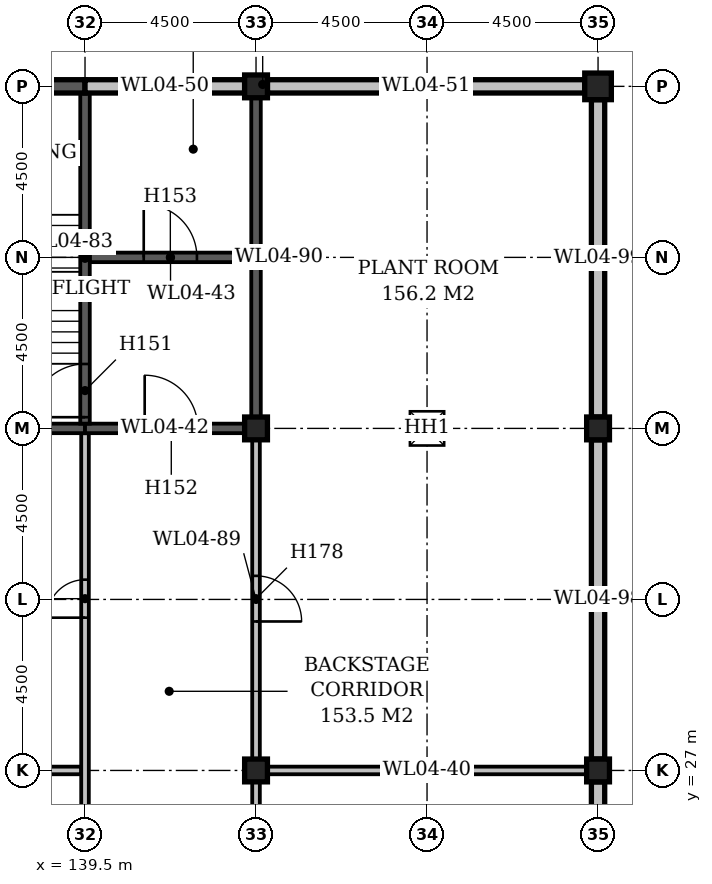
"""IFC4 building model, lengths in metres.
Left out: names, types, materials, properties, quantities, classifications, styles, units other than length and angle.
Written with IfcOpenShell. Run it as: python <this file> out.ifc"""

import sys

from ifc_helpers import new_model, si_unit, direction, frame, frame_2d, origin, origin_2d, place, context, subcontext, project, spatial, rectangle, extrude, element, fill, save


model = new_model("IFC4")
c1 = context("Model", 3, precision=1e-05, world=origin(), true_north=direction((0.0, 1.0)))
c2 = subcontext(c1, "Body", "Model", "MODEL_VIEW")
j1 = project(units=[si_unit("LENGTHUNIT", "METRE"), si_unit("PLANEANGLEUNIT", "RADIAN")], contexts=[c1])
p1 = place(None, origin())
s1 = spatial("IfcSite", under=j1, at=p1, CompositionType="ELEMENT")
p2 = place(p1, origin())
s2 = spatial("IfcBuilding", under=s1, at=p2, CompositionType="ELEMENT")
p3 = place(p2, frame((0.0, 0.0, 24.0)))
s3 = spatial("IfcBuildingStorey", under=s2, at=p3, CompositionType="ELEMENT", Elevation=24.0)
for number, where, z_axis, x_axis in (
    (1, (144.0, 27.0, 0.0), (0.0, 0.0, 1.0), (1.0, 0.0, 0.0)),
    (2, (144.0, 36.0, 0.0), (0.0, 0.0, 1.0), (1.0, 0.0, 0.0)),
    (3, (144.0, 45.0, 0.0), (0.0, 0.0, 1.0), (1.0, 0.0, 0.0)),
    (4, (153.0, 27.0, 0.0), (0.0, 0.0, 1.0), (1.0, 0.0, 0.0)),
    (5, (153.0, 36.0, 0.0), (0.0, 0.0, 1.0), (1.0, 0.0, 0.0)),
):
    element("IfcColumn", number, at=place(p3, frame(where, z_axis=z_axis, x_axis=x_axis)), inside=s3, PredefinedType="COLUMN", context=c2, shape_type="SweptSolid", body=[
        extrude(rectangle(XDim=0.6, YDim=0.6, at=origin_2d()), origin(), (0.0, 0.0, 1.0), 4.7),
    ])
p4 = place(p3, frame((153.0, 45.0, 0.0), z_axis=(0.0, 0.0, 1.0), x_axis=(1.0, 0.0, 0.0)))
e6 = element("IfcColumn", 6, at=p4, inside=s3, PredefinedType="COLUMN", context=c2, shape_type="SweptSolid", body=[
    extrude(rectangle(XDim=0.7, YDim=0.7, at=origin_2d()), origin(), (0.0, 0.0, 1.0), 4.7),
])
p5 = place(p3, frame((135.4, 27.0, 0.0), z_axis=(0.0, 0.0, 1.0), x_axis=(1.0, 0.0, 0.0)))
e7 = element("IfcWall", 7, at=p5, inside=s3, PredefinedType="STANDARD", context=c2, shape_type="SweptSolid", body=[
    extrude(rectangle(XDim=4.0, YDim=0.2, at=frame_2d((2.0, 0.0))), origin(), (0.0, 0.0, 1.0), 4.7),
])
p6 = place(p3, frame((144.3, 27.0, 0.0), z_axis=(0.0, 0.0, 1.0), x_axis=(1.0, 0.0, 0.0)))
e8 = element("IfcWall", 8, at=p6, inside=s3, PredefinedType="STANDARD", context=c2, shape_type="SweptSolid", body=[
    extrude(rectangle(XDim=8.4, YDim=0.2, at=frame_2d((4.2, 0.0))), origin(), (0.0, 0.0, 1.0), 4.7),
])
p7 = place(p3, frame((135.3, 36.0, 0.0), z_axis=(0.0, 0.0, 1.0), x_axis=(1.0, 0.0, 0.0)))
e9 = element("IfcWall", 9, at=p7, inside=s3, PredefinedType="STANDARD", context=c2, shape_type="SweptSolid", body=[
    extrude(rectangle(XDim=4.2, YDim=0.25, at=frame_2d((2.1, 0.0))), origin(), (0.0, 0.0, 1.0), 4.7),
])
p8 = place(p3, frame((139.5, 36.0, 0.0), z_axis=(0.0, 0.0, 1.0), x_axis=(1.0, 0.0, 0.0)))
e10 = element("IfcWall", 10, at=p8, inside=s3, PredefinedType="STANDARD", context=c2, shape_type="SweptSolid", body=[
    extrude(rectangle(XDim=4.2, YDim=0.25, at=frame_2d((2.1, 0.0))), origin(), (0.0, 0.0, 1.0), 4.7),
])
p9 = place(p8, frame((1.57, 0.0, 0.0)))
e11 = element("IfcOpeningElement", 11, at=p9, cuts=e10, PredefinedType="OPENING", context=c2, shape_type="SweptSolid", body=[
    extrude(rectangle(XDim=1.4, YDim=2.1, at=frame_2d((0.7, 1.05))), frame((0.0, 0.137, 0.0), z_axis=(0.0, -1.0, 0.0), x_axis=(1.0, 0.0, 0.0)), (0.0, 0.0, 1.0), 0.274),
])
p10 = place(p3, frame((139.625, 40.5, 0.0), z_axis=(0.0, 0.0, 1.0), x_axis=(1.0, 0.0, 0.0)))
e12 = element("IfcWall", 12, at=p10, inside=s3, PredefinedType="STANDARD", context=c2, shape_type="SweptSolid", body=[
    extrude(rectangle(XDim=4.25, YDim=0.25, at=frame_2d((2.125, 0.0))), origin(), (0.0, 0.0, 1.0), 4.7),
])
p11 = place(p10, frame((1.42, 0.0, 0.0)))
e13 = element("IfcOpeningElement", 13, at=p11, cuts=e12, PredefinedType="OPENING", context=c2, shape_type="SweptSolid", body=[
    extrude(rectangle(XDim=1.4, YDim=2.1, at=frame_2d((0.7, 1.05))), frame((0.0, 0.137, 0.0), z_axis=(0.0, -1.0, 0.0), x_axis=(1.0, 0.0, 0.0)), (0.0, 0.0, 1.0), 0.274),
])
p12 = place(p3, frame((135.4, 45.0, 0.0), z_axis=(0.0, 0.0, 1.0), x_axis=(1.0, 0.0, 0.0)))
e14 = element("IfcWall", 14, at=p12, inside=s3, PredefinedType="STANDARD", context=c2, shape_type="SweptSolid", body=[
    extrude(rectangle(XDim=4.1, YDim=0.35, at=frame_2d((2.05, 0.0))), origin(), (0.0, 0.0, 1.0), 4.1),
])
p13 = place(p3, frame((139.5, 45.0, 0.0), z_axis=(0.0, 0.0, 1.0), x_axis=(1.0, 0.0, 0.0)))
e15 = element("IfcWall", 15, at=p13, inside=s3, PredefinedType="STANDARD", context=c2, shape_type="SweptSolid", body=[
    extrude(rectangle(XDim=4.2, YDim=0.35, at=frame_2d((2.1, 0.0))), origin(), (0.0, 0.0, 1.0), 4.1),
])
p14 = place(p3, frame((144.3, 45.0, 0.0), z_axis=(0.0, 0.0, 1.0), x_axis=(1.0, 0.0, 0.0)))
e16 = element("IfcWall", 16, at=p14, inside=s3, PredefinedType="STANDARD", context=c2, shape_type="SweptSolid", body=[
    extrude(rectangle(XDim=8.35, YDim=0.35, at=frame_2d((4.175, 0.0))), origin(), (0.0, 0.0, 1.0), 4.1),
])
p15 = place(p3, frame((139.5, 0.1, 0.0), z_axis=(0.0, 0.0, 1.0), x_axis=(0.0, 1.0, 0.0)))
e17 = element("IfcWall", 17, at=p15, inside=s3, PredefinedType="STANDARD", context=c2, shape_type="SweptSolid", body=[
    extrude(rectangle(XDim=35.775, YDim=0.2, at=frame_2d((17.887, 0.0))), origin(), (0.0, 0.0, 1.0), 4.7),
])
p16 = place(p15, frame((6.17, 0.0, 0.0)))
e18 = element("IfcOpeningElement", 18, at=p16, cuts=e17, PredefinedType="OPENING", context=c2, shape_type="SweptSolid", body=[
    extrude(rectangle(XDim=1.0, YDim=2.1, at=frame_2d((0.5, 1.05))), frame((0.0, 0.112, 0.0), z_axis=(0.0, -1.0, 0.0), x_axis=(1.0, 0.0, 0.0)), (0.0, 0.0, 1.0), 0.224),
])
p17 = place(p15, frame((10.67, 0.0, 0.0)))
e19 = element("IfcOpeningElement", 19, at=p17, cuts=e17, PredefinedType="OPENING", context=c2, shape_type="SweptSolid", body=[
    extrude(rectangle(XDim=1.0, YDim=2.1, at=frame_2d((0.5, 1.05))), frame((0.0, 0.112, 0.0), z_axis=(0.0, -1.0, 0.0), x_axis=(1.0, 0.0, 0.0)), (0.0, 0.0, 1.0), 0.224),
])
p18 = place(p15, frame((15.17, 0.0, 0.0)))
e20 = element("IfcOpeningElement", 20, at=p18, cuts=e17, PredefinedType="OPENING", context=c2, shape_type="SweptSolid", body=[
    extrude(rectangle(XDim=1.0, YDim=2.1, at=frame_2d((0.5, 1.05))), frame((0.0, 0.112, 0.0), z_axis=(0.0, -1.0, 0.0), x_axis=(1.0, 0.0, 0.0)), (0.0, 0.0, 1.0), 0.224),
])
p19 = place(p15, frame((19.67, 0.0, 0.0)))
e21 = element("IfcOpeningElement", 21, at=p19, cuts=e17, PredefinedType="OPENING", context=c2, shape_type="SweptSolid", body=[
    extrude(rectangle(XDim=1.0, YDim=2.1, at=frame_2d((0.5, 1.05))), frame((0.0, 0.112, 0.0), z_axis=(0.0, -1.0, 0.0), x_axis=(1.0, 0.0, 0.0)), (0.0, 0.0, 1.0), 0.224),
])
p20 = place(p15, frame((24.17, 0.0, 0.0)))
e22 = element("IfcOpeningElement", 22, at=p20, cuts=e17, PredefinedType="OPENING", context=c2, shape_type="SweptSolid", body=[
    extrude(rectangle(XDim=1.0, YDim=2.1, at=frame_2d((0.5, 1.05))), frame((0.0, 0.112, 0.0), z_axis=(0.0, -1.0, 0.0), x_axis=(1.0, 0.0, 0.0)), (0.0, 0.0, 1.0), 0.224),
])
p21 = place(p15, frame((30.92, 0.0, 0.0)))
e23 = element("IfcOpeningElement", 23, at=p21, cuts=e17, PredefinedType="OPENING", context=c2, shape_type="SweptSolid", body=[
    extrude(rectangle(XDim=1.0, YDim=2.1, at=frame_2d((0.5, 1.05))), frame((0.0, 0.112, 0.0), z_axis=(0.0, -1.0, 0.0), x_axis=(1.0, 0.0, 0.0)), (0.0, 0.0, 1.0), 0.224),
])
p22 = place(p3, frame((139.5, 36.125, 0.0), z_axis=(0.0, 0.0, 1.0), x_axis=(0.0, 1.0, 0.0)))
e24 = element("IfcWall", 24, at=p22, inside=s3, PredefinedType="STANDARD", context=c2, shape_type="SweptSolid", body=[
    extrude(rectangle(XDim=8.7, YDim=0.25, at=frame_2d((4.35, 0.0))), origin(), (0.0, 0.0, 1.0), 4.7),
])
p23 = place(p22, frame((0.17, 0.0, 0.0)))
e25 = element("IfcOpeningElement", 25, at=p23, cuts=e24, PredefinedType="OPENING", context=c2, shape_type="SweptSolid", body=[
    extrude(rectangle(XDim=1.4, YDim=2.1, at=frame_2d((0.7, 1.05))), frame((0.0, 0.137, 0.0), z_axis=(0.0, -1.0, 0.0), x_axis=(1.0, 0.0, 0.0)), (0.0, 0.0, 1.0), 0.274),
])
p24 = place(p3, frame((144.0, 18.3, 0.0), z_axis=(0.0, 0.0, 1.0), x_axis=(0.0, 1.0, 0.0)))
e26 = element("IfcWall", 26, at=p24, inside=s3, PredefinedType="STANDARD", context=c2, shape_type="SweptSolid", body=[
    extrude(rectangle(XDim=8.4, YDim=0.2, at=frame_2d((4.2, 0.0))), origin(), (0.0, 0.0, 1.0), 4.7),
])
p25 = place(p24, frame((2.87, 0.0, 0.0)))
e27 = element("IfcOpeningElement", 27, at=p25, cuts=e26, PredefinedType="OPENING", context=c2, shape_type="SweptSolid", body=[
    extrude(rectangle(XDim=1.2, YDim=2.1, at=frame_2d((0.6, 1.05))), frame((0.0, 0.112, 0.0), z_axis=(0.0, -1.0, 0.0), x_axis=(1.0, 0.0, 0.0)), (0.0, 0.0, 1.0), 0.224),
])
p26 = place(p3, frame((144.0, 27.3, 0.0), z_axis=(0.0, 0.0, 1.0), x_axis=(0.0, 1.0, 0.0)))
e28 = element("IfcWall", 28, at=p26, inside=s3, PredefinedType="STANDARD", context=c2, shape_type="SweptSolid", body=[
    extrude(rectangle(XDim=8.4, YDim=0.2, at=frame_2d((4.2, 0.0))), origin(), (0.0, 0.0, 1.0), 4.7),
])
p27 = place(p26, frame((3.62, 0.0, 0.0)))
e29 = element("IfcOpeningElement", 29, at=p27, cuts=e28, PredefinedType="OPENING", context=c2, shape_type="SweptSolid", body=[
    extrude(rectangle(XDim=1.2, YDim=2.1, at=frame_2d((0.6, 1.05))), frame((0.0, 0.112, 0.0), z_axis=(0.0, -1.0, 0.0), x_axis=(1.0, 0.0, 0.0)), (0.0, 0.0, 1.0), 0.224),
])
p28 = place(p3, frame((144.0, 36.3, 0.0), z_axis=(0.0, 0.0, 1.0), x_axis=(0.0, 1.0, 0.0)))
e30 = element("IfcWall", 30, at=p28, inside=s3, PredefinedType="STANDARD", context=c2, shape_type="SweptSolid", body=[
    extrude(rectangle(XDim=8.4, YDim=0.25, at=frame_2d((4.2, 0.0))), origin(), (0.0, 0.0, 1.0), 4.7),
])
p29 = place(p3, frame((153.0, 18.3, 0.0), z_axis=(0.0, 0.0, 1.0), x_axis=(0.0, 1.0, 0.0)))
e31 = element("IfcWall", 31, at=p29, inside=s3, PredefinedType="STANDARD", context=c2, shape_type="SweptSolid", body=[
    extrude(rectangle(XDim=8.4, YDim=0.35, at=frame_2d((4.2, 0.0))), origin(), (0.0, 0.0, 1.0), 4.1),
])
p30 = place(p29, frame((1.35, 0.0, 1.0)))
e32 = element("IfcOpeningElement", 32, at=p30, cuts=e31, PredefinedType="OPENING", context=c2, shape_type="SweptSolid", body=[
    extrude(rectangle(XDim=1.5, YDim=2.4, at=frame_2d((0.75, 1.2))), frame((0.0, 0.187, 0.0), z_axis=(0.0, -1.0, 0.0), x_axis=(1.0, 0.0, 0.0)), (0.0, 0.0, 1.0), 0.374),
])
p31 = place(p29, frame((5.55, 0.0, 1.0)))
e33 = element("IfcOpeningElement", 33, at=p31, cuts=e31, PredefinedType="OPENING", context=c2, shape_type="SweptSolid", body=[
    extrude(rectangle(XDim=1.5, YDim=2.4, at=frame_2d((0.75, 1.2))), frame((0.0, 0.187, 0.0), z_axis=(0.0, -1.0, 0.0), x_axis=(1.0, 0.0, 0.0)), (0.0, 0.0, 1.0), 0.374),
])
p32 = place(p3, frame((153.0, 27.3, 0.0), z_axis=(0.0, 0.0, 1.0), x_axis=(0.0, 1.0, 0.0)))
e34 = element("IfcWall", 34, at=p32, inside=s3, PredefinedType="STANDARD", context=c2, shape_type="SweptSolid", body=[
    extrude(rectangle(XDim=8.4, YDim=0.35, at=frame_2d((4.2, 0.0))), origin(), (0.0, 0.0, 1.0), 4.1),
])
p33 = place(p3, frame((153.0, 36.3, 0.0), z_axis=(0.0, 0.0, 1.0), x_axis=(0.0, 1.0, 0.0)))
e35 = element("IfcWall", 35, at=p33, inside=s3, PredefinedType="STANDARD", context=c2, shape_type="SweptSolid", body=[
    extrude(rectangle(XDim=8.35, YDim=0.35, at=frame_2d((4.175, 0.0))), origin(), (0.0, 0.0, 1.0), 4.1),
])
p34 = place(p3, frame((135.175, 45.05, 5.0), z_axis=(0.0, 0.0, 1.0), x_axis=(1.0, 0.0, 0.0)))
e36 = element("IfcWall", 36, at=p34, inside=s3, PredefinedType="STANDARD", context=c2, shape_type="SweptSolid", body=[
    extrude(rectangle(XDim=18.0, YDim=0.25, at=frame_2d((9.0, 0.0))), origin(), (0.0, 0.0, 1.0), 1.1),
])
p35 = place(p3, frame((153.05, -8.925, 5.0), z_axis=(0.0, 0.0, 1.0), x_axis=(0.0, 1.0, 0.0)))
e37 = element("IfcWall", 37, at=p35, inside=s3, PredefinedType="STANDARD", context=c2, shape_type="SweptSolid", body=[
    extrude(rectangle(XDim=53.85, YDim=0.25, at=frame_2d((26.925, 0.0))), origin(), (0.0, 0.0, 1.0), 1.1),
])
p36 = place(p23, origin())
e38 = element("IfcDoor", 38, at=p36, inside=s3, OperationType="DOUBLE_DOOR_SINGLE_SWING", PredefinedType="DOOR", context=c2, shape_type="SweptSolid", body=[
    extrude(rectangle(XDim=1.4, YDim=2.1, at=frame_2d((0.7, 1.05))), frame((0.0, 0.025, 0.0), z_axis=(0.0, -1.0, 0.0), x_axis=(1.0, 0.0, 0.0)), (0.0, 0.0, 1.0), 0.05),
])
fill(e25, e38)
p37 = place(p9, origin())
e39 = element("IfcDoor", 39, at=p37, inside=s3, OperationType="DOUBLE_DOOR_SINGLE_SWING", PredefinedType="DOOR", context=c2, shape_type="SweptSolid", body=[
    extrude(rectangle(XDim=1.4, YDim=2.1, at=frame_2d((0.7, 1.05))), frame((0.0, 0.025, 0.0), z_axis=(0.0, -1.0, 0.0), x_axis=(1.0, 0.0, 0.0)), (0.0, 0.0, 1.0), 0.05),
])
fill(e11, e39)
p38 = place(p11, origin())
e40 = element("IfcDoor", 40, at=p38, inside=s3, OperationType="DOUBLE_DOOR_SINGLE_SWING", PredefinedType="DOOR", context=c2, shape_type="SweptSolid", body=[
    extrude(rectangle(XDim=1.4, YDim=2.1, at=frame_2d((0.7, 1.05))), frame((0.0, 0.025, 0.0), z_axis=(0.0, -1.0, 0.0), x_axis=(1.0, 0.0, 0.0)), (0.0, 0.0, 1.0), 0.05),
])
fill(e13, e40)
p39 = place(p21, origin())
e41 = element("IfcDoor", 41, at=p39, inside=s3, OperationType="SINGLE_SWING_LEFT", PredefinedType="DOOR", context=c2, shape_type="SweptSolid", body=[
    extrude(rectangle(XDim=1.0, YDim=2.1, at=frame_2d((0.5, 1.05))), frame((0.0, 0.025, 0.0), z_axis=(0.0, -1.0, 0.0), x_axis=(1.0, 0.0, 0.0)), (0.0, 0.0, 1.0), 0.05),
])
fill(e23, e41)
p40 = place(p27, frame((1.2, 0.0, 0.0), z_axis=(0.0, 0.0, 1.0), x_axis=(-1.0, 0.0, 0.0)))
e42 = element("IfcDoor", 42, at=p40, inside=s3, OperationType="SINGLE_SWING_RIGHT", PredefinedType="DOOR", context=c2, shape_type="SweptSolid", body=[
    extrude(rectangle(XDim=1.2, YDim=2.1, at=frame_2d((0.6, 1.05))), frame((0.0, 0.025, 0.0), z_axis=(0.0, -1.0, 0.0), x_axis=(1.0, 0.0, 0.0)), (0.0, 0.0, 1.0), 0.05),
])
fill(e29, e42)
p41 = place(p3, frame((0.0, 0.0, 4.7)))
p42 = place(p41, frame((148.5, 36.0, 0.0)))
p43 = place(p42, frame((0.0, 0.0, 0.25)))
e43 = element("IfcWindow", 43, at=p43, inside=s3, PartitioningType="SINGLE_PANEL", PredefinedType="SKYLIGHT", context=c2, shape_type="SweptSolid", body=[
    extrude(rectangle(XDim=0.9, YDim=0.9, at=origin_2d()), origin(), (0.0, 0.0, 1.0), 0.05),
])
save(model, sys.argv[1])
